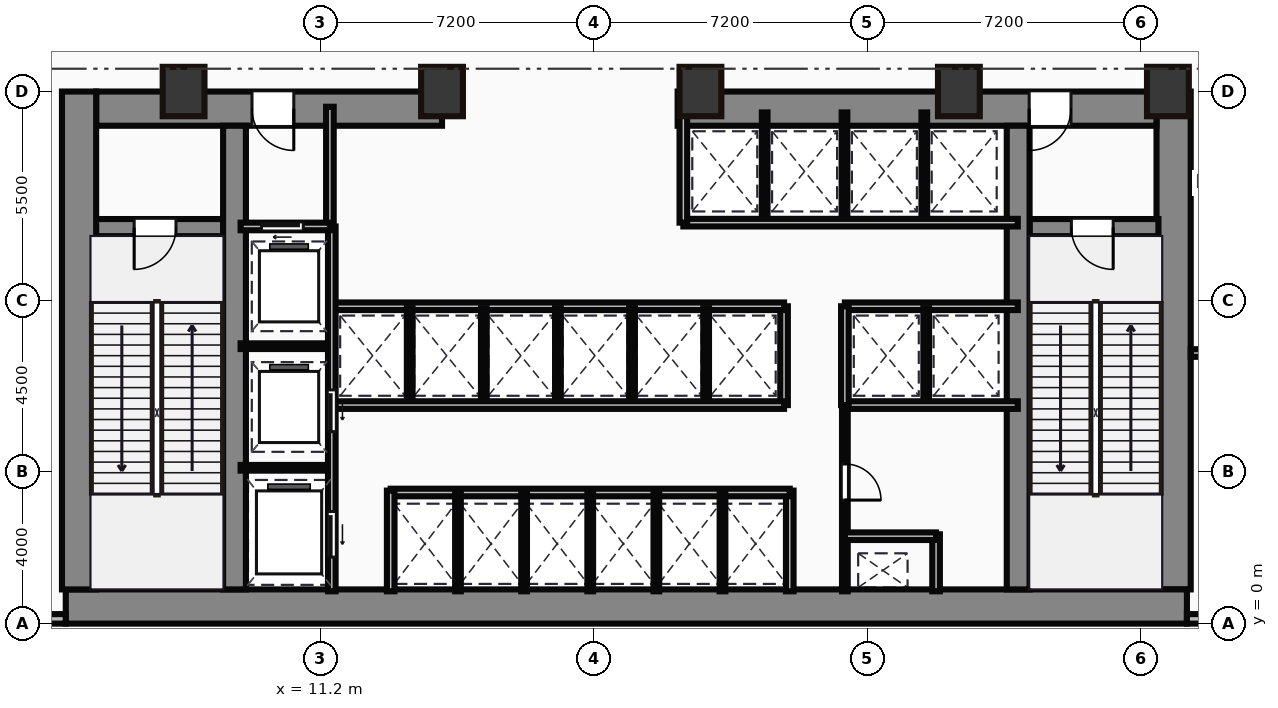
"""IFC4 building model, lengths in metres.
Left out: names, types, materials, properties, quantities, classifications, styles, units other than length and angle.
Written with IfcOpenShell. Run it as: python <this file> out.ifc"""

import sys

from ifc_helpers import new_model, si_unit, direction, frame, frame_2d, origin, origin_2d, place, context, subcontext, project, spatial, rectangle, hollow_rectangle, extrude, source, transform, mapped, element, fill, save


model = new_model("IFC4")
c1 = context("Model", 3, precision=1e-05, world=origin(), true_north=direction((0.0, 1.0)))
c2 = subcontext(c1, "Body", "Model", "MODEL_VIEW")
j1 = project(units=[si_unit("LENGTHUNIT", "METRE"), si_unit("PLANEANGLEUNIT", "RADIAN")], contexts=[c1])
p1 = place(None, origin())
s1 = spatial("IfcSite", under=j1, at=p1, CompositionType="ELEMENT")
p2 = place(p1, origin())
s2 = spatial("IfcBuilding", under=s1, at=p2, CompositionType="ELEMENT")
p3 = place(p2, frame((0.0, 0.0, 26.0)))
s3 = spatial("IfcBuildingStorey", under=s2, at=p3, CompositionType="ELEMENT", Elevation=26.0)
m1 = source(origin(), c2, "Body", "SweptSolid", [
    extrude(rectangle(XDim=29.5, YDim=0.9, at=frame_2d((14.75, 0.0))), origin(), (0.0, 0.0, 1.0), 6.5),
])
p4 = place(p3, frame((4.5, 0.45, 0.0), z_axis=(0.0, 0.0, 1.0), x_axis=(1.0, 0.0, 0.0)))
e1 = element("IfcWall", 1, at=p4, inside=s3, PredefinedType="SHEAR", context=c2, shape_type="MappedRepresentation", body=[
    mapped(m1, transform((0.0, 0.0, 0.0))),
])
m2 = source(origin(), c2, "Body", "SweptSolid", [
    extrude(rectangle(XDim=13.1, YDim=0.9, at=frame_2d((6.55, 0.0))), origin(), (0.0, 0.0, 1.0), 6.5),
])
for number, where, z_axis, x_axis in (
    (2, (4.85, 0.9, 0.0), (0.0, 0.0, 1.0), (0.0, 1.0, 0.0)),
    (3, (33.65, 0.9, 0.0), (0.0, 0.0, 1.0), (0.0, 1.0, 0.0)),
):
    element("IfcWall", number, at=place(p3, frame(where, z_axis=z_axis, x_axis=x_axis)), inside=s3, PredefinedType="SHEAR", context=c2, shape_type="MappedRepresentation", body=[
        mapped(m2, transform((0.0, 0.0, 0.0))),
    ])
m3 = source(origin(), c2, "Body", "SweptSolid", [
    extrude(rectangle(XDim=9.1, YDim=0.9, at=frame_2d((4.55, 0.0))), origin(), (0.0, 0.0, 1.0), 6.5),
])
p5 = place(p3, frame((5.3, 13.55, 0.0), z_axis=(0.0, 0.0, 1.0), x_axis=(1.0, 0.0, 0.0)))
e4 = element("IfcWall", 4, at=p5, inside=s3, PredefinedType="SHEAR", context=c2, shape_type="MappedRepresentation", body=[
    mapped(m3, transform((0.0, 0.0, 0.0))),
])
p6 = place(p5, frame((4.1, 0.0, 0.0)))
e5 = element("IfcOpeningElement", 5, at=p6, cuts=e4, PredefinedType="OPENING", context=c2, shape_type="SweptSolid", body=[
    extrude(rectangle(XDim=1.1, YDim=2.15, at=frame_2d((0.55, 1.075))), frame((0.0, 0.46, 0.0), z_axis=(0.0, -1.0, 0.0), x_axis=(1.0, 0.0, 0.0)), (0.0, 0.0, 1.0), 0.92),
])
m4 = source(origin(), c2, "Body", "SweptSolid", [
    extrude(rectangle(XDim=12.6, YDim=0.9, at=frame_2d((6.3, 0.0))), origin(), (0.0, 0.0, 1.0), 6.5),
])
p7 = place(p3, frame((20.6, 13.55, 0.0), z_axis=(0.0, 0.0, 1.0), x_axis=(1.0, 0.0, 0.0)))
e6 = element("IfcWall", 6, at=p7, inside=s3, PredefinedType="SHEAR", context=c2, shape_type="MappedRepresentation", body=[
    mapped(m4, transform((0.0, 0.0, 0.0))),
])
p8 = place(p7, frame((9.25, 0.0, 0.0)))
e7 = element("IfcOpeningElement", 7, at=p8, cuts=e6, PredefinedType="OPENING", context=c2, shape_type="SweptSolid", body=[
    extrude(rectangle(XDim=1.1, YDim=2.15, at=frame_2d((0.55, 1.075))), frame((0.0, 0.46, 0.0), z_axis=(0.0, -1.0, 0.0), x_axis=(1.0, 0.0, 0.0)), (0.0, 0.0, 1.0), 0.92),
])
m5 = source(origin(), c2, "Body", "SweptSolid", [
    extrude(rectangle(XDim=12.2, YDim=0.6, at=frame_2d((6.1, 0.0))), origin(), (0.0, 0.0, 1.0), 6.5),
])
for number, where, z_axis, x_axis in (
    (8, (8.94, 0.9, 0.0), (0.0, 0.0, 1.0), (0.0, 1.0, 0.0)),
    (9, (29.56, 0.9, 0.0), (0.0, 0.0, 1.0), (0.0, 1.0, 0.0)),
):
    element("IfcWall", number, at=place(p3, frame(where, z_axis=z_axis, x_axis=x_axis)), inside=s3, PredefinedType="SHEAR", context=c2, shape_type="MappedRepresentation", body=[
        mapped(m5, transform((0.0, 0.0, 0.0))),
    ])
m6 = source(origin(), c2, "Body", "SweptSolid", [
    extrude(rectangle(XDim=3.39, YDim=0.45, at=frame_2d((1.695, 0.0))), origin(), (0.0, 0.0, 1.0), 6.5),
])
p9 = place(p3, frame((5.25, 10.42, 0.0), z_axis=(0.0, 0.0, 1.0), x_axis=(1.0, 0.0, 0.0)))
e10 = element("IfcWall", 10, at=p9, inside=s3, PredefinedType="SHEAR", context=c2, shape_type="MappedRepresentation", body=[
    mapped(m6, transform((0.0, 0.0, 0.0))),
])
p10 = place(p9, frame((1.05, 0.0, 0.0)))
e11 = element("IfcOpeningElement", 11, at=p10, cuts=e10, PredefinedType="OPENING", context=c2, shape_type="SweptSolid", body=[
    extrude(rectangle(XDim=1.1, YDim=2.15, at=frame_2d((0.55, 1.075))), frame((0.0, 0.235, 0.0), z_axis=(0.0, -1.0, 0.0), x_axis=(1.0, 0.0, 0.0)), (0.0, 0.0, 1.0), 0.47),
])
p11 = place(p3, frame((29.86, 10.42, 0.0), z_axis=(0.0, 0.0, 1.0), x_axis=(1.0, 0.0, 0.0)))
e12 = element("IfcWall", 12, at=p11, inside=s3, PredefinedType="SHEAR", context=c2, shape_type="MappedRepresentation", body=[
    mapped(m6, transform((0.0, 0.0, 0.0))),
])
p12 = place(p11, frame((1.1, 0.0, 0.0)))
e13 = element("IfcOpeningElement", 13, at=p12, cuts=e12, PredefinedType="OPENING", context=c2, shape_type="SweptSolid", body=[
    extrude(rectangle(XDim=1.1, YDim=2.15, at=frame_2d((0.55, 1.075))), frame((0.0, 0.235, 0.0), z_axis=(0.0, -1.0, 0.0), x_axis=(1.0, 0.0, 0.0)), (0.0, 0.0, 1.0), 0.47),
])
m7 = source(origin(), c2, "Body", "SweptSolid", [
    extrude(hollow_rectangle(XDim=1.1, YDim=1.3, WallThickness=0.055, at=origin_2d()), origin(), (0.0, 0.0, 1.0), 6.5),
])
for number, where, z_axis, x_axis in (
    (14, (7.6, 14.0, 0.0), (0.0, 0.0, 1.0), (1.0, 0.0, 0.0)),
    (15, (14.4, 14.0, 0.0), (0.0, 0.0, 1.0), (1.0, 0.0, 0.0)),
    (16, (21.2, 14.0, 0.0), (0.0, 0.0, 1.0), (1.0, 0.0, 0.0)),
    (17, (28.0, 14.0, 0.0), (0.0, 0.0, 1.0), (1.0, 0.0, 0.0)),
    (18, (33.5, 14.0, 0.0), (0.0, 0.0, 1.0), (1.0, 0.0, 0.0)),
):
    element("IfcColumn", number, at=place(p3, frame(where, z_axis=z_axis, x_axis=x_axis)), inside=s3, PredefinedType="PILASTER", context=c2, shape_type="MappedRepresentation", body=[
        mapped(m7, transform((0.0, 0.0, 0.0))),
    ])
m8 = source(origin(), c2, "Body", "SweptSolid", [
    extrude(rectangle(XDim=4.5, YDim=0.25, at=frame_2d((2.25, 0.0))), origin(), (0.0, 0.0, 1.0), 6.25),
])
p13 = place(p3, frame((0.0, 0.125, 0.0), z_axis=(0.0, 0.0, 1.0), x_axis=(1.0, 0.0, 0.0)))
e19 = element("IfcWall", 19, at=p13, inside=s3, PredefinedType="STANDARD", context=c2, shape_type="MappedRepresentation", body=[
    mapped(m8, transform((0.0, 0.0, 0.0))),
])
m9 = source(origin(), c2, "Body", "SweptSolid", [
    extrude(rectangle(XDim=48.0, YDim=0.25, at=frame_2d((24.0, 0.0))), origin(), (0.0, 0.0, 1.0), 6.25),
])
p14 = place(p3, frame((34.0, 0.125, 0.0), z_axis=(0.0, 0.0, 1.0), x_axis=(1.0, 0.0, 0.0)))
e20 = element("IfcWall", 20, at=p14, inside=s3, PredefinedType="STANDARD", context=c2, shape_type="MappedRepresentation", body=[
    mapped(m9, transform((0.0, 0.0, 0.0))),
])
m10 = source(origin(), c2, "Body", "SweptSolid", [
    extrude(rectangle(XDim=3.18, YDim=0.2, at=frame_2d((1.59, 0.0))), origin(), (0.0, 0.0, 1.0), 6.25),
])
p15 = place(p3, frame((11.45, 10.42, 0.0), z_axis=(0.0, 0.0, 1.0), x_axis=(0.0, 1.0, 0.0)))
e21 = element("IfcWall", 21, at=p15, inside=s3, PredefinedType="PARTITIONING", context=c2, shape_type="MappedRepresentation", body=[
    mapped(m10, transform((0.0, 0.0, 0.0))),
])
m11 = source(origin(), c2, "Body", "SweptSolid", [
    extrude(rectangle(XDim=2.35, YDim=0.2, at=frame_2d((1.175, 0.0))), origin(), (0.0, 0.0, 1.0), 6.25),
])
p16 = place(p3, frame((9.1, 10.45, 0.0), z_axis=(0.0, 0.0, 1.0), x_axis=(1.0, 0.0, 0.0)))
e22 = element("IfcWall", 22, at=p16, inside=s3, PredefinedType="PARTITIONING", context=c2, shape_type="MappedRepresentation", body=[
    mapped(m11, transform((0.0, 0.0, 0.0))),
])
p17 = place(p16, frame((0.55, 0.0, 0.0)))
e23 = element("IfcOpeningElement", 23, at=p17, cuts=e22, PredefinedType="OPENING", context=c2, shape_type="SweptSolid", body=[
    extrude(rectangle(XDim=1.1, YDim=2.15, at=frame_2d((0.55, 1.075))), frame((0.0, 0.11, 0.0), z_axis=(0.0, -1.0, 0.0), x_axis=(1.0, 0.0, 0.0)), (0.0, 0.0, 1.0), 0.22),
])
m12 = source(origin(), c2, "Body", "SweptSolid", [
    extrude(rectangle(XDim=9.6, YDim=0.2, at=frame_2d((4.8, 0.0))), origin(), (0.0, 0.0, 1.0), 6.25),
])
p18 = place(p3, frame((11.5, 0.85, 0.0), z_axis=(0.0, 0.0, 1.0), x_axis=(0.0, 1.0, 0.0)))
e24 = element("IfcWall", 24, at=p18, inside=s3, PredefinedType="PARTITIONING", context=c2, shape_type="MappedRepresentation", body=[
    mapped(m12, transform((0.0, 0.0, 0.0))),
])
p19 = place(p18, frame((4.2, 0.0, 0.0)))
e25 = element("IfcOpeningElement", 25, at=p19, cuts=e24, PredefinedType="OPENING", context=c2, shape_type="SweptSolid", body=[
    extrude(rectangle(XDim=1.1, YDim=2.15, at=frame_2d((0.55, 1.075))), frame((0.0, 0.11, 0.0), z_axis=(0.0, -1.0, 0.0), x_axis=(1.0, 0.0, 0.0)), (0.0, 0.0, 1.0), 0.22),
])
p20 = place(p18, frame((0.9, 0.0, 0.0)))
e26 = element("IfcOpeningElement", 26, at=p20, cuts=e24, PredefinedType="OPENING", context=c2, shape_type="SweptSolid", body=[
    extrude(rectangle(XDim=1.2, YDim=2.15, at=frame_2d((0.6, 1.075))), frame((0.0, 0.11, 0.0), z_axis=(0.0, -1.0, 0.0), x_axis=(1.0, 0.0, 0.0)), (0.0, 0.0, 1.0), 0.22),
])
m13 = source(origin(), c2, "Body", "SweptSolid", [
    extrude(rectangle(XDim=2.4, YDim=0.15, at=frame_2d((1.2, 0.0))), origin(), (0.0, 0.0, 1.0), 6.25),
])
for number, where, z_axis, x_axis in (
    (27, (9.1, 4.1, 0.0), (0.0, 0.0, 1.0), (1.0, 0.0, 0.0)),
    (28, (9.1, 7.3, 0.0), (0.0, 0.0, 1.0), (1.0, 0.0, 0.0)),
):
    element("IfcWall", number, at=place(p3, frame(where, z_axis=z_axis, x_axis=x_axis)), inside=s3, PredefinedType="PARTITIONING", context=c2, shape_type="MappedRepresentation", body=[
        mapped(m13, transform((0.0, 0.0, 0.0))),
    ])
m14 = source(origin(), c2, "Body", "SweptSolid", [
    extrude(rectangle(XDim=2.65, YDim=0.2, at=frame_2d((1.325, 0.0))), origin(), (0.0, 0.0, 1.0), 6.25),
])
p21 = place(p3, frame((13.05, 0.85, 0.0), z_axis=(0.0, 0.0, 1.0), x_axis=(0.0, 1.0, 0.0)))
e29 = element("IfcWall", 29, at=p21, inside=s3, PredefinedType="PARTITIONING", context=c2, shape_type="MappedRepresentation", body=[
    mapped(m14, transform((0.0, 0.0, 0.0))),
])
m15 = source(origin(), c2, "Body", "SweptSolid", [
    extrude(rectangle(XDim=10.5, YDim=0.2, at=frame_2d((5.25, 0.0))), origin(), (0.0, 0.0, 1.0), 6.25),
])
p22 = place(p3, frame((13.05, 3.45, 0.0), z_axis=(0.0, 0.0, 1.0), x_axis=(1.0, 0.0, 0.0)))
e30 = element("IfcWall", 30, at=p22, inside=s3, PredefinedType="PARTITIONING", context=c2, shape_type="MappedRepresentation", body=[
    mapped(m15, transform((0.0, 0.0, 0.0))),
])
p23 = place(p3, frame((23.55, 0.85, 0.0), z_axis=(0.0, 0.0, 1.0), x_axis=(0.0, 1.0, 0.0)))
e31 = element("IfcWall", 31, at=p23, inside=s3, PredefinedType="PARTITIONING", context=c2, shape_type="MappedRepresentation", body=[
    mapped(m14, transform((0.0, 0.0, 0.0))),
])
m16 = source(origin(), c2, "Body", "SweptSolid", [
    extrude(rectangle(XDim=2.6, YDim=0.15, at=frame_2d((1.3, 0.0))), origin(), (0.0, 0.0, 1.0), 6.25),
])
for number, where, z_axis, x_axis in (
    (32, (14.82, 0.85, 0.0), (0.0, 0.0, 1.0), (0.0, 1.0, 0.0)),
    (33, (16.56, 0.85, 0.0), (0.0, 0.0, 1.0), (0.0, 1.0, 0.0)),
    (34, (18.3, 0.85, 0.0), (0.0, 0.0, 1.0), (0.0, 1.0, 0.0)),
    (35, (20.04, 0.85, 0.0), (0.0, 0.0, 1.0), (0.0, 1.0, 0.0)),
    (36, (21.78, 0.85, 0.0), (0.0, 0.0, 1.0), (0.0, 1.0, 0.0)),
):
    element("IfcWall", number, at=place(p3, frame(where, z_axis=z_axis, x_axis=x_axis)), inside=s3, PredefinedType="PARTITIONING", context=c2, shape_type="MappedRepresentation", body=[
        mapped(m16, transform((0.0, 0.0, 0.0))),
    ])
m17 = source(origin(), c2, "Body", "SweptSolid", [
    extrude(rectangle(XDim=11.85, YDim=0.2, at=frame_2d((5.925, 0.0))), origin(), (0.0, 0.0, 1.0), 6.25),
])
for number, where, z_axis, x_axis in (
    (37, (11.55, 5.75, 0.0), (0.0, 0.0, 1.0), (1.0, 0.0, 0.0)),
    (38, (11.55, 8.35, 0.0), (0.0, 0.0, 1.0), (1.0, 0.0, 0.0)),
):
    element("IfcWall", number, at=place(p3, frame(where, z_axis=z_axis, x_axis=x_axis)), inside=s3, PredefinedType="PARTITIONING", context=c2, shape_type="MappedRepresentation", body=[
        mapped(m17, transform((0.0, 0.0, 0.0))),
    ])
m18 = source(origin(), c2, "Body", "SweptSolid", [
    extrude(rectangle(XDim=2.6, YDim=0.2, at=frame_2d((1.3, 0.0))), origin(), (0.0, 0.0, 1.0), 6.25),
])
p24 = place(p3, frame((23.4, 5.75, 0.0), z_axis=(0.0, 0.0, 1.0), x_axis=(0.0, 1.0, 0.0)))
e39 = element("IfcWall", 39, at=p24, inside=s3, PredefinedType="PARTITIONING", context=c2, shape_type="MappedRepresentation", body=[
    mapped(m18, transform((0.0, 0.0, 0.0))),
])
m19 = source(origin(), c2, "Body", "SweptSolid", [
    extrude(rectangle(XDim=2.5, YDim=0.15, at=frame_2d((1.25, 0.0))), origin(), (0.0, 0.0, 1.0), 6.25),
])
for number, where, z_axis, x_axis in (
    (40, (13.55, 5.8, 0.0), (0.0, 0.0, 1.0), (0.0, 1.0, 0.0)),
    (41, (15.5, 5.8, 0.0), (0.0, 0.0, 1.0), (0.0, 1.0, 0.0)),
    (42, (17.45, 5.8, 0.0), (0.0, 0.0, 1.0), (0.0, 1.0, 0.0)),
    (43, (19.4, 5.8, 0.0), (0.0, 0.0, 1.0), (0.0, 1.0, 0.0)),
    (44, (21.35, 5.8, 0.0), (0.0, 0.0, 1.0), (0.0, 1.0, 0.0)),
):
    element("IfcWall", number, at=place(p3, frame(where, z_axis=z_axis, x_axis=x_axis)), inside=s3, PredefinedType="PARTITIONING", context=c2, shape_type="MappedRepresentation", body=[
        mapped(m19, transform((0.0, 0.0, 0.0))),
    ])
m20 = source(origin(), c2, "Body", "SweptSolid", [
    extrude(rectangle(XDim=8.8, YDim=0.2, at=frame_2d((4.4, 0.0))), origin(), (0.0, 0.0, 1.0), 6.25),
])
p25 = place(p3, frame((20.75, 10.55, 0.0), z_axis=(0.0, 0.0, 1.0), x_axis=(1.0, 0.0, 0.0)))
e45 = element("IfcWall", 45, at=p25, inside=s3, PredefinedType="PARTITIONING", context=c2, shape_type="MappedRepresentation", body=[
    mapped(m20, transform((0.0, 0.0, 0.0))),
])
m21 = source(origin(), c2, "Body", "SweptSolid", [
    extrude(rectangle(XDim=3.0, YDim=0.2, at=frame_2d((1.5, 0.0))), origin(), (0.0, 0.0, 1.0), 6.25),
])
p26 = place(p3, frame((20.75, 10.55, 0.0), z_axis=(0.0, 0.0, 1.0), x_axis=(0.0, 1.0, 0.0)))
e46 = element("IfcWall", 46, at=p26, inside=s3, PredefinedType="PARTITIONING", context=c2, shape_type="MappedRepresentation", body=[
    mapped(m21, transform((0.0, 0.0, 0.0))),
])
m22 = source(origin(), c2, "Body", "SweptSolid", [
    extrude(rectangle(XDim=2.85, YDim=0.15, at=frame_2d((1.425, 0.0))), origin(), (0.0, 0.0, 1.0), 6.25),
])
for number, where, z_axis, x_axis in (
    (47, (22.89, 10.6, 0.0), (0.0, 0.0, 1.0), (0.0, 1.0, 0.0)),
    (48, (24.99, 10.6, 0.0), (0.0, 0.0, 1.0), (0.0, 1.0, 0.0)),
    (49, (27.09, 10.6, 0.0), (0.0, 0.0, 1.0), (0.0, 1.0, 0.0)),
):
    element("IfcWall", number, at=place(p3, frame(where, z_axis=z_axis, x_axis=x_axis)), inside=s3, PredefinedType="PARTITIONING", context=c2, shape_type="MappedRepresentation", body=[
        mapped(m22, transform((0.0, 0.0, 0.0))),
    ])
m23 = source(origin(), c2, "Body", "SweptSolid", [
    extrude(rectangle(XDim=4.55, YDim=0.2, at=frame_2d((2.275, 0.0))), origin(), (0.0, 0.0, 1.0), 6.25),
])
for number, where, z_axis, x_axis in (
    (50, (25.0, 8.35, 0.0), (0.0, 0.0, 1.0), (1.0, 0.0, 0.0)),
    (51, (25.0, 5.75, 0.0), (0.0, 0.0, 1.0), (1.0, 0.0, 0.0)),
):
    element("IfcWall", number, at=place(p3, frame(where, z_axis=z_axis, x_axis=x_axis)), inside=s3, PredefinedType="PARTITIONING", context=c2, shape_type="MappedRepresentation", body=[
        mapped(m23, transform((0.0, 0.0, 0.0))),
    ])
p27 = place(p3, frame((25.0, 5.75, 0.0), z_axis=(0.0, 0.0, 1.0), x_axis=(0.0, 1.0, 0.0)))
e52 = element("IfcWall", 52, at=p27, inside=s3, PredefinedType="PARTITIONING", context=c2, shape_type="MappedRepresentation", body=[
    mapped(m18, transform((0.0, 0.0, 0.0))),
])
p28 = place(p3, frame((27.14, 5.8, 0.0), z_axis=(0.0, 0.0, 1.0), x_axis=(0.0, 1.0, 0.0)))
e53 = element("IfcWall", 53, at=p28, inside=s3, PredefinedType="PARTITIONING", context=c2, shape_type="MappedRepresentation", body=[
    mapped(m19, transform((0.0, 0.0, 0.0))),
])
m24 = source(origin(), c2, "Body", "SweptSolid", [
    extrude(rectangle(XDim=4.9, YDim=0.15, at=frame_2d((2.45, 0.0))), origin(), (0.0, 0.0, 1.0), 6.25),
])
p29 = place(p3, frame((25.0, 0.85, 0.0), z_axis=(0.0, 0.0, 1.0), x_axis=(0.0, 1.0, 0.0)))
e54 = element("IfcWall", 54, at=p29, inside=s3, PredefinedType="PARTITIONING", context=c2, shape_type="MappedRepresentation", body=[
    mapped(m24, transform((0.0, 0.0, 0.0))),
])
p30 = place(p29, frame((2.4, 0.0, 0.0)))
e55 = element("IfcOpeningElement", 55, at=p30, cuts=e54, PredefinedType="OPENING", context=c2, shape_type="SweptSolid", body=[
    extrude(rectangle(XDim=0.95, YDim=2.15, at=frame_2d((0.475, 1.075))), frame((0.0, 0.085, 0.0), z_axis=(0.0, -1.0, 0.0), x_axis=(1.0, 0.0, 0.0)), (0.0, 0.0, 1.0), 0.17),
])
m25 = source(origin(), c2, "Body", "SweptSolid", [
    extrude(rectangle(XDim=2.4, YDim=0.2, at=frame_2d((1.2, 0.0))), origin(), (0.0, 0.0, 1.0), 6.25),
])
p31 = place(p3, frame((25.0, 2.3, 0.0), z_axis=(0.0, 0.0, 1.0), x_axis=(1.0, 0.0, 0.0)))
e56 = element("IfcWall", 56, at=p31, inside=s3, PredefinedType="PARTITIONING", context=c2, shape_type="MappedRepresentation", body=[
    mapped(m25, transform((0.0, 0.0, 0.0))),
])
m26 = source(origin(), c2, "Body", "SweptSolid", [
    extrude(rectangle(XDim=1.5, YDim=0.2, at=frame_2d((0.75, 0.0))), origin(), (0.0, 0.0, 1.0), 6.25),
])
p32 = place(p3, frame((27.4, 0.85, 0.0), z_axis=(0.0, 0.0, 1.0), x_axis=(0.0, 1.0, 0.0)))
e57 = element("IfcWall", 57, at=p32, inside=s3, PredefinedType="PARTITIONING", context=c2, shape_type="MappedRepresentation", body=[
    mapped(m26, transform((0.0, 0.0, 0.0))),
])
m27 = source(origin(), c2, "Body", "SweptSolid", [
    extrude(rectangle(XDim=23.85, YDim=0.2, at=frame_2d((11.925, 0.0))), origin(), (0.0, 0.0, 1.0), 6.25),
])
p33 = place(p3, frame((34.1, 7.12, 0.0), z_axis=(0.0, 0.0, 1.0), x_axis=(1.0, 0.0, 0.0)))
e58 = element("IfcWall", 58, at=p33, inside=s3, PredefinedType="PARTITIONING", context=c2, shape_type="MappedRepresentation", body=[
    mapped(m27, transform((0.0, 0.0, 0.0))),
])
p34 = place(p33, frame((10.5, 0.0, 0.0)))
e59 = element("IfcOpeningElement", 59, at=p34, cuts=e58, PredefinedType="OPENING", context=c2, shape_type="SweptSolid", body=[
    extrude(rectangle(XDim=1.1, YDim=2.15, at=frame_2d((0.55, 1.075))), frame((0.0, 0.11, 0.0), z_axis=(0.0, -1.0, 0.0), x_axis=(1.0, 0.0, 0.0)), (0.0, 0.0, 1.0), 0.22),
])
m28 = source(origin(), c2, "Body", "SweptSolid", [
    extrude(rectangle(XDim=1.1, YDim=2.15, at=frame_2d((0.55, 1.075))), frame((0.0, 0.025, 0.0), z_axis=(0.0, -1.0, 0.0), x_axis=(1.0, 0.0, 0.0)), (0.0, 0.0, 1.0), 0.05),
])
p35 = place(p10, frame((1.1, 0.0, 0.0), z_axis=(0.0, 0.0, 1.0), x_axis=(-1.0, 0.0, 0.0)))
e60 = element("IfcDoor", 60, at=p35, inside=s3, OperationType="SINGLE_SWING_LEFT", PredefinedType="DOOR", context=c2, shape_type="MappedRepresentation", body=[
    mapped(m28, transform((0.0, 0.0, 0.0))),
])
fill(e11, e60)
p36 = place(p12, frame((1.1, 0.0, 0.0), z_axis=(0.0, 0.0, 1.0), x_axis=(-1.0, 0.0, 0.0)))
e61 = element("IfcDoor", 61, at=p36, inside=s3, OperationType="SINGLE_SWING_RIGHT", PredefinedType="DOOR", context=c2, shape_type="MappedRepresentation", body=[
    mapped(m28, transform((0.0, 0.0, 0.0))),
])
fill(e13, e61)
p37 = place(p6, origin())
e62 = element("IfcDoor", 62, at=p37, inside=s3, OperationType="SINGLE_SWING_RIGHT", PredefinedType="DOOR", context=c2, shape_type="MappedRepresentation", body=[
    mapped(m28, transform((0.0, 0.0, 0.0))),
])
fill(e5, e62)
p38 = place(p8, origin())
e63 = element("IfcDoor", 63, at=p38, inside=s3, OperationType="SINGLE_SWING_LEFT", PredefinedType="DOOR", context=c2, shape_type="MappedRepresentation", body=[
    mapped(m28, transform((0.0, 0.0, 0.0))),
])
fill(e7, e63)
p39 = place(p17, origin())
e64 = element("IfcDoor", 64, at=p39, inside=s3, OperationType="SLIDING_TO_LEFT", PredefinedType="DOOR", context=c2, shape_type="MappedRepresentation", body=[
    mapped(m28, transform((0.0, 0.0, 0.0))),
])
fill(e23, e64)
p40 = place(p19, frame((1.1, 0.0, 0.0), z_axis=(0.0, 0.0, 1.0), x_axis=(-1.0, 0.0, 0.0)))
e65 = element("IfcDoor", 65, at=p40, inside=s3, OperationType="SLIDING_TO_LEFT", PredefinedType="DOOR", context=c2, shape_type="MappedRepresentation", body=[
    mapped(m28, transform((0.0, 0.0, 0.0))),
])
fill(e25, e65)
m29 = source(origin(), c2, "Body", "SweptSolid", [
    extrude(rectangle(XDim=1.2, YDim=2.15, at=frame_2d((0.6, 1.075))), frame((0.0, 0.025, 0.0), z_axis=(0.0, -1.0, 0.0), x_axis=(1.0, 0.0, 0.0)), (0.0, 0.0, 1.0), 0.05),
])
p41 = place(p20, frame((1.2, 0.0, 0.0), z_axis=(0.0, 0.0, 1.0), x_axis=(-1.0, 0.0, 0.0)))
e66 = element("IfcDoor", 66, at=p41, inside=s3, OperationType="SLIDING_TO_LEFT", PredefinedType="DOOR", context=c2, shape_type="MappedRepresentation", body=[
    mapped(m29, transform((0.0, 0.0, 0.0))),
])
fill(e26, e66)
m30 = source(origin(), c2, "Body", "SweptSolid", [
    extrude(rectangle(XDim=0.95, YDim=2.15, at=frame_2d((0.475, 1.075))), frame((0.0, 0.025, 0.0), z_axis=(0.0, -1.0, 0.0), x_axis=(1.0, 0.0, 0.0)), (0.0, 0.0, 1.0), 0.05),
])
p42 = place(p30, origin())
e67 = element("IfcDoor", 67, at=p42, inside=s3, OperationType="SINGLE_SWING_LEFT", PredefinedType="DOOR", context=c2, shape_type="MappedRepresentation", body=[
    mapped(m30, transform((0.0, 0.0, 0.0))),
])
fill(e55, e67)
save(model, sys.argv[1])
